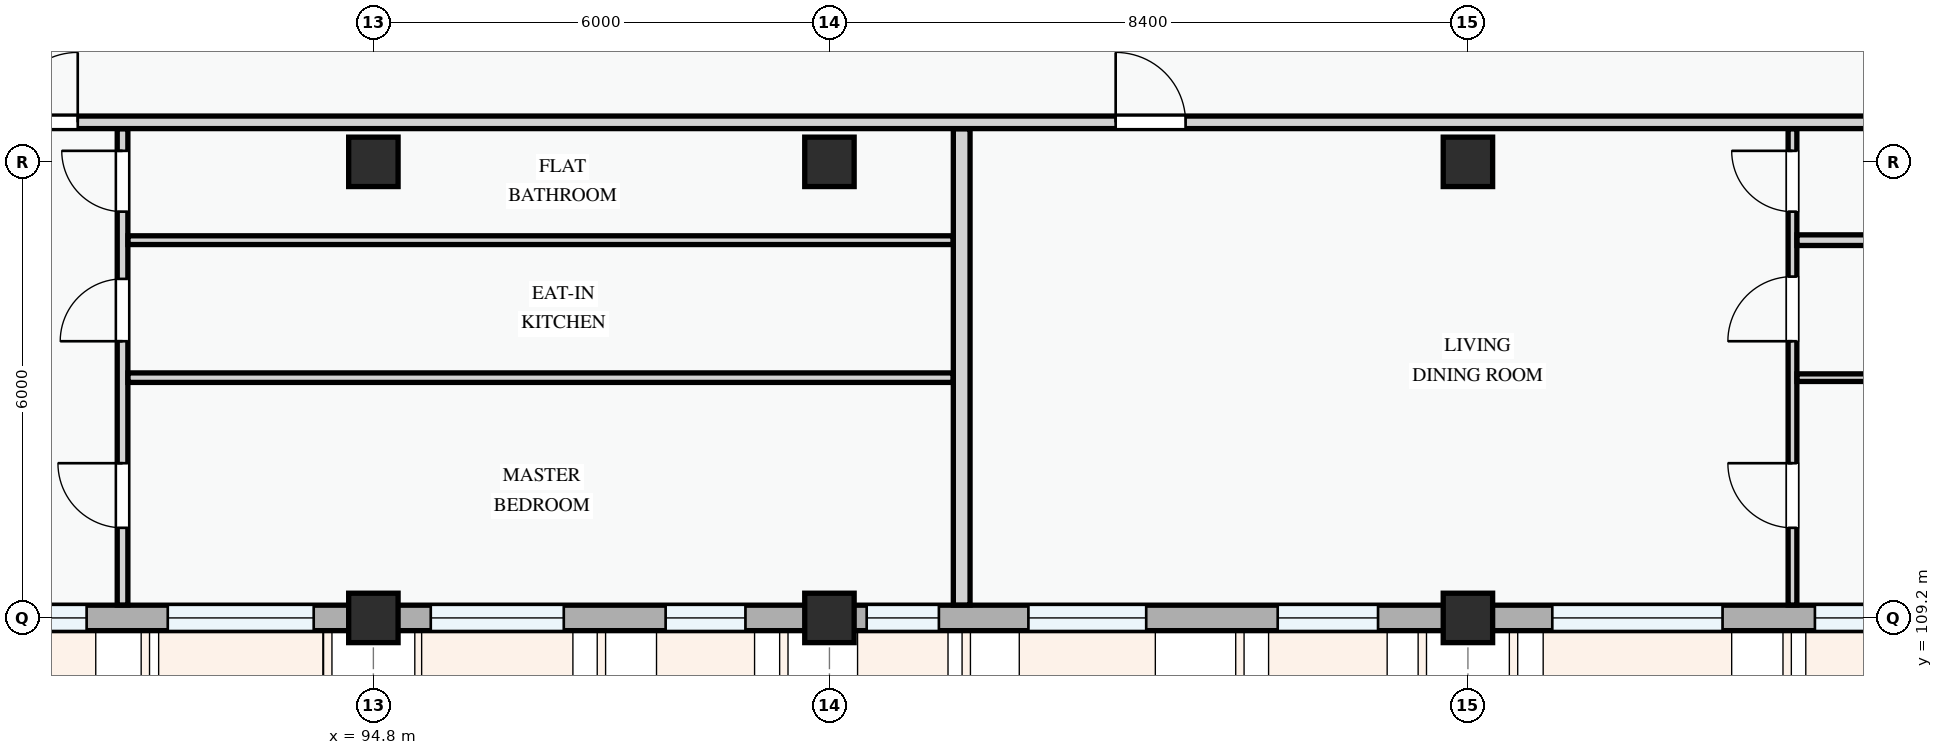
"""IFC4 building model, lengths in metres.
Left out: names, types, materials, properties, quantities, classifications, styles, units other than length and angle.
Written with IfcOpenShell. Run it as: python <this file> out.ifc"""

import sys

from ifc_helpers import new_model, si_unit, direction, frame, frame_2d, origin, origin_2d, place, context, subcontext, project, spatial, rectangle, extrude, element, fill, save


model = new_model("IFC4")
c1 = context("Model", 3, precision=1e-05, world=origin(), true_north=direction((0.0, 1.0)))
c2 = subcontext(c1, "Body", "Model", "MODEL_VIEW")
j1 = project(units=[si_unit("LENGTHUNIT", "METRE"), si_unit("PLANEANGLEUNIT", "RADIAN")], contexts=[c1])
p1 = place(None, origin())
s1 = spatial("IfcSite", under=j1, at=p1, CompositionType="ELEMENT")
p2 = place(p1, origin())
s2 = spatial("IfcBuilding", under=s1, at=p2, CompositionType="ELEMENT")
p3 = place(p2, frame((0.0, 0.0, 14.7)))
s3 = spatial("IfcBuildingStorey", under=s2, at=p3, CompositionType="ELEMENT", Elevation=14.7)
for number, where, z_axis, x_axis in (
    (1, (94.8, 109.2, 0.0), (0.0, 0.0, 1.0), (1.0, 0.0, 0.0)),
    (2, (94.8, 115.2, 0.0), (0.0, 0.0, 1.0), (1.0, 0.0, 0.0)),
    (3, (100.8, 109.2, 0.0), (0.0, 0.0, 1.0), (1.0, 0.0, 0.0)),
    (4, (100.8, 115.2, 0.0), (0.0, 0.0, 1.0), (1.0, 0.0, 0.0)),
    (5, (109.2, 109.2, 0.0), (0.0, 0.0, 1.0), (1.0, 0.0, 0.0)),
    (6, (109.2, 115.2, 0.0), (0.0, 0.0, 1.0), (1.0, 0.0, 0.0)),
):
    element("IfcColumn", number, at=place(p3, frame(where, z_axis=z_axis, x_axis=x_axis)), inside=s3, PredefinedType="COLUMN", context=c2, shape_type="SweptSolid", body=[
        extrude(rectangle(XDim=0.65, YDim=0.65, at=origin_2d()), origin(), (0.0, 0.0, 1.0), 3.3),
    ])
p4 = place(p3, frame((86.4, 109.2, 0.0), z_axis=(0.0, 0.0, 1.0), x_axis=(1.0, 0.0, 0.0)))
e7 = element("IfcWall", 7, at=p4, inside=s3, PredefinedType="STANDARD", context=c2, shape_type="SweptSolid", body=[
    extrude(rectangle(XDim=8.4, YDim=0.335, at=frame_2d((4.2, 0.0))), origin(), (0.0, 0.0, 1.0), 2.375),
])
p5 = place(p4, frame((0.877, 0.0, 0.78)))
e8 = element("IfcOpeningElement", 8, at=p5, cuts=e7, PredefinedType="OPENING", context=c2, shape_type="SweptSolid", body=[
    extrude(rectangle(XDim=1.15, YDim=1.25, at=frame_2d((0.575, 0.625))), frame((0.0, 0.177, 0.0), z_axis=(0.0, -1.0, 0.0), x_axis=(1.0, 0.0, 0.0)), (0.0, 0.0, 1.0), 0.355),
])
p6 = place(p4, frame((3.048, 0.0, 0.78)))
e9 = element("IfcOpeningElement", 9, at=p6, cuts=e7, PredefinedType="OPENING", context=c2, shape_type="SweptSolid", body=[
    extrude(rectangle(XDim=1.58, YDim=1.48, at=frame_2d((0.79, 0.74))), frame((0.0, 0.177, 0.0), z_axis=(0.0, -1.0, 0.0), x_axis=(1.0, 0.0, 0.0)), (0.0, 0.0, 1.0), 0.355),
])
p7 = place(p4, frame((5.695, 0.0, 0.78)))
e10 = element("IfcOpeningElement", 10, at=p7, cuts=e7, PredefinedType="OPENING", context=c2, shape_type="SweptSolid", body=[
    extrude(rectangle(XDim=1.92, YDim=1.44, at=frame_2d((0.96, 0.72))), frame((0.0, 0.177, 0.0), z_axis=(0.0, -1.0, 0.0), x_axis=(1.0, 0.0, 0.0)), (0.0, 0.0, 1.0), 0.355),
])
p8 = place(p3, frame((94.8, 109.2, 0.0), z_axis=(0.0, 0.0, 1.0), x_axis=(1.0, 0.0, 0.0)))
e11 = element("IfcWall", 11, at=p8, inside=s3, PredefinedType="STANDARD", context=c2, shape_type="SweptSolid", body=[
    extrude(rectangle(XDim=6.0, YDim=0.335, at=frame_2d((3.0, 0.0))), origin(), (0.0, 0.0, 1.0), 2.475),
])
p9 = place(p8, frame((0.755, 0.0, 0.78)))
e12 = element("IfcOpeningElement", 12, at=p9, cuts=e11, PredefinedType="OPENING", context=c2, shape_type="SweptSolid", body=[
    extrude(rectangle(XDim=1.75, YDim=1.45, at=frame_2d((0.875, 0.725))), frame((0.0, 0.177, 0.0), z_axis=(0.0, -1.0, 0.0), x_axis=(1.0, 0.0, 0.0)), (0.0, 0.0, 1.0), 0.355),
])
p10 = place(p8, frame((3.845, 0.0, 0.78)))
e13 = element("IfcOpeningElement", 13, at=p10, cuts=e11, PredefinedType="OPENING", context=c2, shape_type="SweptSolid", body=[
    extrude(rectangle(XDim=1.05, YDim=1.2, at=frame_2d((0.525, 0.6))), frame((0.0, 0.177, 0.0), z_axis=(0.0, -1.0, 0.0), x_axis=(1.0, 0.0, 0.0)), (0.0, 0.0, 1.0), 0.355),
])
p11 = place(p3, frame((100.8, 109.2, 0.0), z_axis=(0.0, 0.0, 1.0), x_axis=(1.0, 0.0, 0.0)))
e14 = element("IfcWall", 14, at=p11, inside=s3, PredefinedType="STANDARD", context=c2, shape_type="SweptSolid", body=[
    extrude(rectangle(XDim=8.4, YDim=0.335, at=frame_2d((4.2, 0.0))), origin(), (0.0, 0.0, 1.0), 2.375),
])
p12 = place(p11, frame((0.49, 0.0, 0.78)))
e15 = element("IfcOpeningElement", 15, at=p12, cuts=e14, PredefinedType="OPENING", context=c2, shape_type="SweptSolid", body=[
    extrude(rectangle(XDim=0.95, YDim=1.15, at=frame_2d((0.475, 0.575))), frame((0.0, 0.177, 0.0), z_axis=(0.0, -1.0, 0.0), x_axis=(1.0, 0.0, 0.0)), (0.0, 0.0, 1.0), 0.355),
])
p13 = place(p11, frame((2.617, 0.0, 0.78)))
e16 = element("IfcOpeningElement", 16, at=p13, cuts=e14, PredefinedType="OPENING", context=c2, shape_type="SweptSolid", body=[
    extrude(rectangle(XDim=1.55, YDim=1.4, at=frame_2d((0.775, 0.7))), frame((0.0, 0.177, 0.0), z_axis=(0.0, -1.0, 0.0), x_axis=(1.0, 0.0, 0.0)), (0.0, 0.0, 1.0), 0.355),
])
p14 = place(p11, frame((5.897, 0.0, 0.78)))
e17 = element("IfcOpeningElement", 17, at=p14, cuts=e14, PredefinedType="OPENING", context=c2, shape_type="SweptSolid", body=[
    extrude(rectangle(XDim=1.32, YDim=1.35, at=frame_2d((0.66, 0.675))), frame((0.0, 0.177, 0.0), z_axis=(0.0, -1.0, 0.0), x_axis=(1.0, 0.0, 0.0)), (0.0, 0.0, 1.0), 0.355),
])
p15 = place(p3, frame((109.2, 109.2, 0.0), z_axis=(0.0, 0.0, 1.0), x_axis=(1.0, 0.0, 0.0)))
e18 = element("IfcWall", 18, at=p15, inside=s3, PredefinedType="STANDARD", context=c2, shape_type="SweptSolid", body=[
    extrude(rectangle(XDim=6.0, YDim=0.335, at=frame_2d((3.0, 0.0))), origin(), (0.0, 0.0, 1.0), 2.475),
])
p16 = place(p15, frame((1.11, 0.0, 0.78)))
e19 = element("IfcOpeningElement", 19, at=p16, cuts=e18, PredefinedType="OPENING", context=c2, shape_type="SweptSolid", body=[
    extrude(rectangle(XDim=2.24, YDim=1.52, at=frame_2d((1.12, 0.76))), frame((0.0, 0.177, 0.0), z_axis=(0.0, -1.0, 0.0), x_axis=(1.0, 0.0, 0.0)), (0.0, 0.0, 1.0), 0.355),
])
p17 = place(p15, frame((4.565, 0.0, 0.78)))
e20 = element("IfcOpeningElement", 20, at=p17, cuts=e18, PredefinedType="OPENING", context=c2, shape_type="SweptSolid", body=[
    extrude(rectangle(XDim=0.95, YDim=1.15, at=frame_2d((0.475, 0.575))), frame((0.0, 0.177, 0.0), z_axis=(0.0, -1.0, 0.0), x_axis=(1.0, 0.0, 0.0)), (0.0, 0.0, 1.0), 0.355),
])
p18 = place(p3, frame((91.5, 109.369, 0.0), z_axis=(0.0, 0.0, 1.0), x_axis=(0.0, 1.0, 0.0)))
e21 = element("IfcWall", 21, at=p18, inside=s3, PredefinedType="PARTITIONING", context=c2, shape_type="SweptSolid", body=[
    extrude(rectangle(XDim=6.266, YDim=0.14, at=frame_2d((3.133, 0.0))), origin(), (0.0, 0.0, 1.0), 3.0),
])
p19 = place(p18, frame((1.016, 0.0, 0.0)))
e22 = element("IfcOpeningElement", 22, at=p19, cuts=e21, PredefinedType="OPENING", context=c2, shape_type="SweptSolid", body=[
    extrude(rectangle(XDim=0.85, YDim=2.1, at=frame_2d((0.425, 1.05))), frame((0.0, 0.08, 0.0), z_axis=(0.0, -1.0, 0.0), x_axis=(1.0, 0.0, 0.0)), (0.0, 0.0, 1.0), 0.16),
])
p20 = place(p18, frame((3.471, 0.0, 0.0)))
e23 = element("IfcOpeningElement", 23, at=p20, cuts=e21, PredefinedType="OPENING", context=c2, shape_type="SweptSolid", body=[
    extrude(rectangle(XDim=0.82, YDim=2.08, at=frame_2d((0.41, 1.04))), frame((0.0, 0.08, 0.0), z_axis=(0.0, -1.0, 0.0), x_axis=(1.0, 0.0, 0.0)), (0.0, 0.0, 1.0), 0.16),
])
p21 = place(p18, frame((5.175, 0.0, 0.0)))
e24 = element("IfcOpeningElement", 24, at=p21, cuts=e21, PredefinedType="OPENING", context=c2, shape_type="SweptSolid", body=[
    extrude(rectangle(XDim=0.8, YDim=2.1, at=frame_2d((0.4, 1.05))), frame((0.0, 0.08, 0.0), z_axis=(0.0, -1.0, 0.0), x_axis=(1.0, 0.0, 0.0)), (0.0, 0.0, 1.0), 0.16),
])
p22 = place(p3, frame((91.572, 112.361, 0.0), z_axis=(0.0, 0.0, 1.0), x_axis=(1.0, 0.0, 0.0)))
e25 = element("IfcWall", 25, at=p22, inside=s3, PredefinedType="PARTITIONING", context=c2, shape_type="SweptSolid", body=[
    extrude(rectangle(XDim=10.856, YDim=0.125, at=frame_2d((5.428, 0.0))), origin(), (0.0, 0.0, 1.0), 3.0),
])
p23 = place(p3, frame((91.572, 114.17, 0.0), z_axis=(0.0, 0.0, 1.0), x_axis=(1.0, 0.0, 0.0)))
e26 = element("IfcWall", 26, at=p23, inside=s3, PredefinedType="PARTITIONING", context=c2, shape_type="SweptSolid", body=[
    extrude(rectangle(XDim=10.856, YDim=0.115, at=frame_2d((5.428, 0.0))), origin(), (0.0, 0.0, 1.0), 3.0),
])
p24 = place(p3, frame((113.47, 109.369, 0.0), z_axis=(0.0, 0.0, 1.0), x_axis=(0.0, 1.0, 0.0)))
e27 = element("IfcWall", 27, at=p24, inside=s3, PredefinedType="PARTITIONING", context=c2, shape_type="SweptSolid", body=[
    extrude(rectangle(XDim=6.266, YDim=0.115, at=frame_2d((3.133, 0.0))), origin(), (0.0, 0.0, 1.0), 3.0),
])
p25 = place(p24, frame((1.016, 0.0, 0.0)))
e28 = element("IfcOpeningElement", 28, at=p25, cuts=e27, PredefinedType="OPENING", context=c2, shape_type="SweptSolid", body=[
    extrude(rectangle(XDim=0.85, YDim=2.1, at=frame_2d((0.425, 1.05))), frame((0.0, 0.067, 0.0), z_axis=(0.0, -1.0, 0.0), x_axis=(1.0, 0.0, 0.0)), (0.0, 0.0, 1.0), 0.135),
])
p26 = place(p24, frame((3.471, 0.0, 0.0)))
e29 = element("IfcOpeningElement", 29, at=p26, cuts=e27, PredefinedType="OPENING", context=c2, shape_type="SweptSolid", body=[
    extrude(rectangle(XDim=0.85, YDim=2.1, at=frame_2d((0.425, 1.05))), frame((0.0, 0.067, 0.0), z_axis=(0.0, -1.0, 0.0), x_axis=(1.0, 0.0, 0.0)), (0.0, 0.0, 1.0), 0.135),
])
p27 = place(p24, frame((5.175, 0.0, 0.0)))
e30 = element("IfcOpeningElement", 30, at=p27, cuts=e27, PredefinedType="OPENING", context=c2, shape_type="SweptSolid", body=[
    extrude(rectangle(XDim=0.8, YDim=2.1, at=frame_2d((0.4, 1.05))), frame((0.0, 0.067, 0.0), z_axis=(0.0, -1.0, 0.0), x_axis=(1.0, 0.0, 0.0)), (0.0, 0.0, 1.0), 0.135),
])
p28 = place(p3, frame((113.53, 112.361, 0.0), z_axis=(0.0, 0.0, 1.0), x_axis=(1.0, 0.0, 0.0)))
e31 = element("IfcWall", 31, at=p28, inside=s3, PredefinedType="PARTITIONING", context=c2, shape_type="SweptSolid", body=[
    extrude(rectangle(XDim=11.769, YDim=0.1, at=frame_2d((5.884, 0.0))), origin(), (0.0, 0.0, 1.0), 3.0),
])
p29 = place(p3, frame((113.53, 114.17, 0.0), z_axis=(0.0, 0.0, 1.0), x_axis=(1.0, 0.0, 0.0)))
e32 = element("IfcWall", 32, at=p29, inside=s3, PredefinedType="PARTITIONING", context=c2, shape_type="SweptSolid", body=[
    extrude(rectangle(XDim=11.769, YDim=0.14, at=frame_2d((5.884, 0.0))), origin(), (0.0, 0.0, 1.0), 3.0),
])
p30 = place(p3, frame((102.54, 109.369, 0.0), z_axis=(0.0, 0.0, 1.0), x_axis=(0.0, 1.0, 0.0)))
e33 = element("IfcWall", 33, at=p30, inside=s3, PredefinedType="PARTITIONING", context=c2, shape_type="SweptSolid", body=[
    extrude(rectangle(XDim=6.266, YDim=0.22, at=frame_2d((3.133, 0.0))), origin(), (0.0, 0.0, 1.0), 3.0),
])
p31 = place(p3, frame((80.57, 115.72, 0.0), z_axis=(0.0, 0.0, 1.0), x_axis=(1.0, 0.0, 0.0)))
e34 = element("IfcWall", 34, at=p31, inside=s3, PredefinedType="PARTITIONING", context=c2, shape_type="SweptSolid", body=[
    extrude(rectangle(XDim=69.48, YDim=0.165, at=frame_2d((34.74, 0.0))), origin(), (0.0, 0.0, 1.0), 3.0),
])
p32 = place(p31, frame((9.421, 0.0, 0.0)))
e35 = element("IfcOpeningElement", 35, at=p32, cuts=e34, PredefinedType="OPENING", context=c2, shape_type="SweptSolid", body=[
    extrude(rectangle(XDim=0.92, YDim=2.1, at=frame_2d((0.46, 1.05))), frame((0.0, 0.093, 0.0), z_axis=(0.0, -1.0, 0.0), x_axis=(1.0, 0.0, 0.0)), (0.0, 0.0, 1.0), 0.185),
])
p33 = place(p31, frame((23.996, 0.0, 0.0)))
e36 = element("IfcOpeningElement", 36, at=p33, cuts=e34, PredefinedType="OPENING", context=c2, shape_type="SweptSolid", body=[
    extrude(rectangle(XDim=0.92, YDim=2.1, at=frame_2d((0.46, 1.05))), frame((0.0, 0.093, 0.0), z_axis=(0.0, -1.0, 0.0), x_axis=(1.0, 0.0, 0.0)), (0.0, 0.0, 1.0), 0.185),
])
p34 = place(p31, frame((52.69, 0.0, 0.0)))
e37 = element("IfcOpeningElement", 37, at=p34, cuts=e34, PredefinedType="OPENING", context=c2, shape_type="SweptSolid", body=[
    extrude(rectangle(XDim=0.92, YDim=2.1, at=frame_2d((0.46, 1.05))), frame((0.0, 0.093, 0.0), z_axis=(0.0, -1.0, 0.0), x_axis=(1.0, 0.0, 0.0)), (0.0, 0.0, 1.0), 0.185),
])
p35 = place(p6, origin())
e38 = element("IfcWindow", 38, at=p35, inside=s3, PartitioningType="SINGLE_PANEL", PredefinedType="WINDOW", context=c2, shape_type="SweptSolid", body=[
    extrude(rectangle(XDim=1.58, YDim=1.48, at=frame_2d((0.79, 0.74))), frame((0.0, 0.03, 0.0), z_axis=(0.0, -1.0, 0.0), x_axis=(1.0, 0.0, 0.0)), (0.0, 0.0, 1.0), 0.06),
])
fill(e9, e38)
p36 = place(p7, origin())
e39 = element("IfcWindow", 39, at=p36, inside=s3, PartitioningType="DOUBLE_PANEL_VERTICAL", PredefinedType="WINDOW", context=c2, shape_type="SweptSolid", body=[
    extrude(rectangle(XDim=1.92, YDim=1.44, at=frame_2d((0.96, 0.72))), frame((0.0, 0.03, 0.0), z_axis=(0.0, -1.0, 0.0), x_axis=(1.0, 0.0, 0.0)), (0.0, 0.0, 1.0), 0.06),
])
fill(e10, e39)
p37 = place(p9, origin())
e40 = element("IfcWindow", 40, at=p37, inside=s3, PartitioningType="DOUBLE_PANEL_VERTICAL", PredefinedType="WINDOW", context=c2, shape_type="SweptSolid", body=[
    extrude(rectangle(XDim=1.75, YDim=1.45, at=frame_2d((0.875, 0.725))), frame((0.0, 0.03, 0.0), z_axis=(0.0, -1.0, 0.0), x_axis=(1.0, 0.0, 0.0)), (0.0, 0.0, 1.0), 0.06),
])
fill(e12, e40)
p38 = place(p10, origin())
e41 = element("IfcWindow", 41, at=p38, inside=s3, PartitioningType="SINGLE_PANEL", PredefinedType="WINDOW", context=c2, shape_type="SweptSolid", body=[
    extrude(rectangle(XDim=1.05, YDim=1.2, at=frame_2d((0.525, 0.6))), frame((0.0, 0.03, 0.0), z_axis=(0.0, -1.0, 0.0), x_axis=(1.0, 0.0, 0.0)), (0.0, 0.0, 1.0), 0.06),
])
fill(e13, e41)
p39 = place(p12, origin())
e42 = element("IfcWindow", 42, at=p39, inside=s3, PartitioningType="SINGLE_PANEL", PredefinedType="WINDOW", context=c2, shape_type="SweptSolid", body=[
    extrude(rectangle(XDim=0.95, YDim=1.15, at=frame_2d((0.475, 0.575))), frame((0.0, 0.03, 0.0), z_axis=(0.0, -1.0, 0.0), x_axis=(1.0, 0.0, 0.0)), (0.0, 0.0, 1.0), 0.06),
])
fill(e15, e42)
p40 = place(p13, origin())
e43 = element("IfcWindow", 43, at=p40, inside=s3, PartitioningType="SINGLE_PANEL", PredefinedType="WINDOW", context=c2, shape_type="SweptSolid", body=[
    extrude(rectangle(XDim=1.55, YDim=1.4, at=frame_2d((0.775, 0.7))), frame((0.0, 0.03, 0.0), z_axis=(0.0, -1.0, 0.0), x_axis=(1.0, 0.0, 0.0)), (0.0, 0.0, 1.0), 0.06),
])
fill(e16, e43)
p41 = place(p14, origin())
e44 = element("IfcWindow", 44, at=p41, inside=s3, PartitioningType="SINGLE_PANEL", PredefinedType="WINDOW", context=c2, shape_type="SweptSolid", body=[
    extrude(rectangle(XDim=1.32, YDim=1.35, at=frame_2d((0.66, 0.675))), frame((0.0, 0.03, 0.0), z_axis=(0.0, -1.0, 0.0), x_axis=(1.0, 0.0, 0.0)), (0.0, 0.0, 1.0), 0.06),
])
fill(e17, e44)
p42 = place(p16, origin())
e45 = element("IfcWindow", 45, at=p42, inside=s3, PartitioningType="DOUBLE_PANEL_VERTICAL", PredefinedType="WINDOW", context=c2, shape_type="SweptSolid", body=[
    extrude(rectangle(XDim=2.24, YDim=1.52, at=frame_2d((1.12, 0.76))), frame((0.0, 0.03, 0.0), z_axis=(0.0, -1.0, 0.0), x_axis=(1.0, 0.0, 0.0)), (0.0, 0.0, 1.0), 0.06),
])
fill(e19, e45)
p43 = place(p17, origin())
e46 = element("IfcWindow", 46, at=p43, inside=s3, PartitioningType="SINGLE_PANEL", PredefinedType="WINDOW", context=c2, shape_type="SweptSolid", body=[
    extrude(rectangle(XDim=0.95, YDim=1.15, at=frame_2d((0.475, 0.575))), frame((0.0, 0.03, 0.0), z_axis=(0.0, -1.0, 0.0), x_axis=(1.0, 0.0, 0.0)), (0.0, 0.0, 1.0), 0.06),
])
fill(e20, e46)
p44 = place(p19, origin())
e47 = element("IfcDoor", 47, at=p44, inside=s3, OperationType="SINGLE_SWING_RIGHT", PredefinedType="DOOR", context=c2, shape_type="SweptSolid", body=[
    extrude(rectangle(XDim=0.85, YDim=2.1, at=frame_2d((0.425, 1.05))), frame((0.0, 0.025, 0.0), z_axis=(0.0, -1.0, 0.0), x_axis=(1.0, 0.0, 0.0)), (0.0, 0.0, 1.0), 0.05),
])
fill(e22, e47)
p45 = place(p20, origin())
e48 = element("IfcDoor", 48, at=p45, inside=s3, OperationType="SINGLE_SWING_LEFT", PredefinedType="DOOR", context=c2, shape_type="SweptSolid", body=[
    extrude(rectangle(XDim=0.82, YDim=2.08, at=frame_2d((0.41, 1.04))), frame((0.0, 0.025, 0.0), z_axis=(0.0, -1.0, 0.0), x_axis=(1.0, 0.0, 0.0)), (0.0, 0.0, 1.0), 0.05),
])
fill(e23, e48)
p46 = place(p21, origin())
e49 = element("IfcDoor", 49, at=p46, inside=s3, OperationType="SINGLE_SWING_RIGHT", PredefinedType="DOOR", context=c2, shape_type="SweptSolid", body=[
    extrude(rectangle(XDim=0.8, YDim=2.1, at=frame_2d((0.4, 1.05))), frame((0.0, 0.025, 0.0), z_axis=(0.0, -1.0, 0.0), x_axis=(1.0, 0.0, 0.0)), (0.0, 0.0, 1.0), 0.05),
])
fill(e24, e49)
p47 = place(p25, origin())
e50 = element("IfcDoor", 50, at=p47, inside=s3, OperationType="SINGLE_SWING_RIGHT", PredefinedType="DOOR", context=c2, shape_type="SweptSolid", body=[
    extrude(rectangle(XDim=0.85, YDim=2.1, at=frame_2d((0.425, 1.05))), frame((0.0, 0.025, 0.0), z_axis=(0.0, -1.0, 0.0), x_axis=(1.0, 0.0, 0.0)), (0.0, 0.0, 1.0), 0.05),
])
fill(e28, e50)
p48 = place(p26, origin())
e51 = element("IfcDoor", 51, at=p48, inside=s3, OperationType="SINGLE_SWING_LEFT", PredefinedType="DOOR", context=c2, shape_type="SweptSolid", body=[
    extrude(rectangle(XDim=0.85, YDim=2.1, at=frame_2d((0.425, 1.05))), frame((0.0, 0.025, 0.0), z_axis=(0.0, -1.0, 0.0), x_axis=(1.0, 0.0, 0.0)), (0.0, 0.0, 1.0), 0.05),
])
fill(e29, e51)
p49 = place(p27, origin())
e52 = element("IfcDoor", 52, at=p49, inside=s3, OperationType="SINGLE_SWING_RIGHT", PredefinedType="DOOR", context=c2, shape_type="SweptSolid", body=[
    extrude(rectangle(XDim=0.8, YDim=2.1, at=frame_2d((0.4, 1.05))), frame((0.0, 0.025, 0.0), z_axis=(0.0, -1.0, 0.0), x_axis=(1.0, 0.0, 0.0)), (0.0, 0.0, 1.0), 0.05),
])
fill(e30, e52)
p50 = place(p32, origin())
e53 = element("IfcDoor", 53, at=p50, inside=s3, OperationType="SINGLE_SWING_RIGHT", PredefinedType="DOOR", context=c2, shape_type="SweptSolid", body=[
    extrude(rectangle(XDim=0.92, YDim=2.1, at=frame_2d((0.46, 1.05))), frame((0.0, 0.025, 0.0), z_axis=(0.0, -1.0, 0.0), x_axis=(1.0, 0.0, 0.0)), (0.0, 0.0, 1.0), 0.05),
])
fill(e35, e53)
p51 = place(p33, origin())
e54 = element("IfcDoor", 54, at=p51, inside=s3, OperationType="SINGLE_SWING_LEFT", PredefinedType="DOOR", context=c2, shape_type="SweptSolid", body=[
    extrude(rectangle(XDim=0.92, YDim=2.1, at=frame_2d((0.46, 1.05))), frame((0.0, 0.025, 0.0), z_axis=(0.0, -1.0, 0.0), x_axis=(1.0, 0.0, 0.0)), (0.0, 0.0, 1.0), 0.05),
])
fill(e36, e54)
save(model, sys.argv[1])
